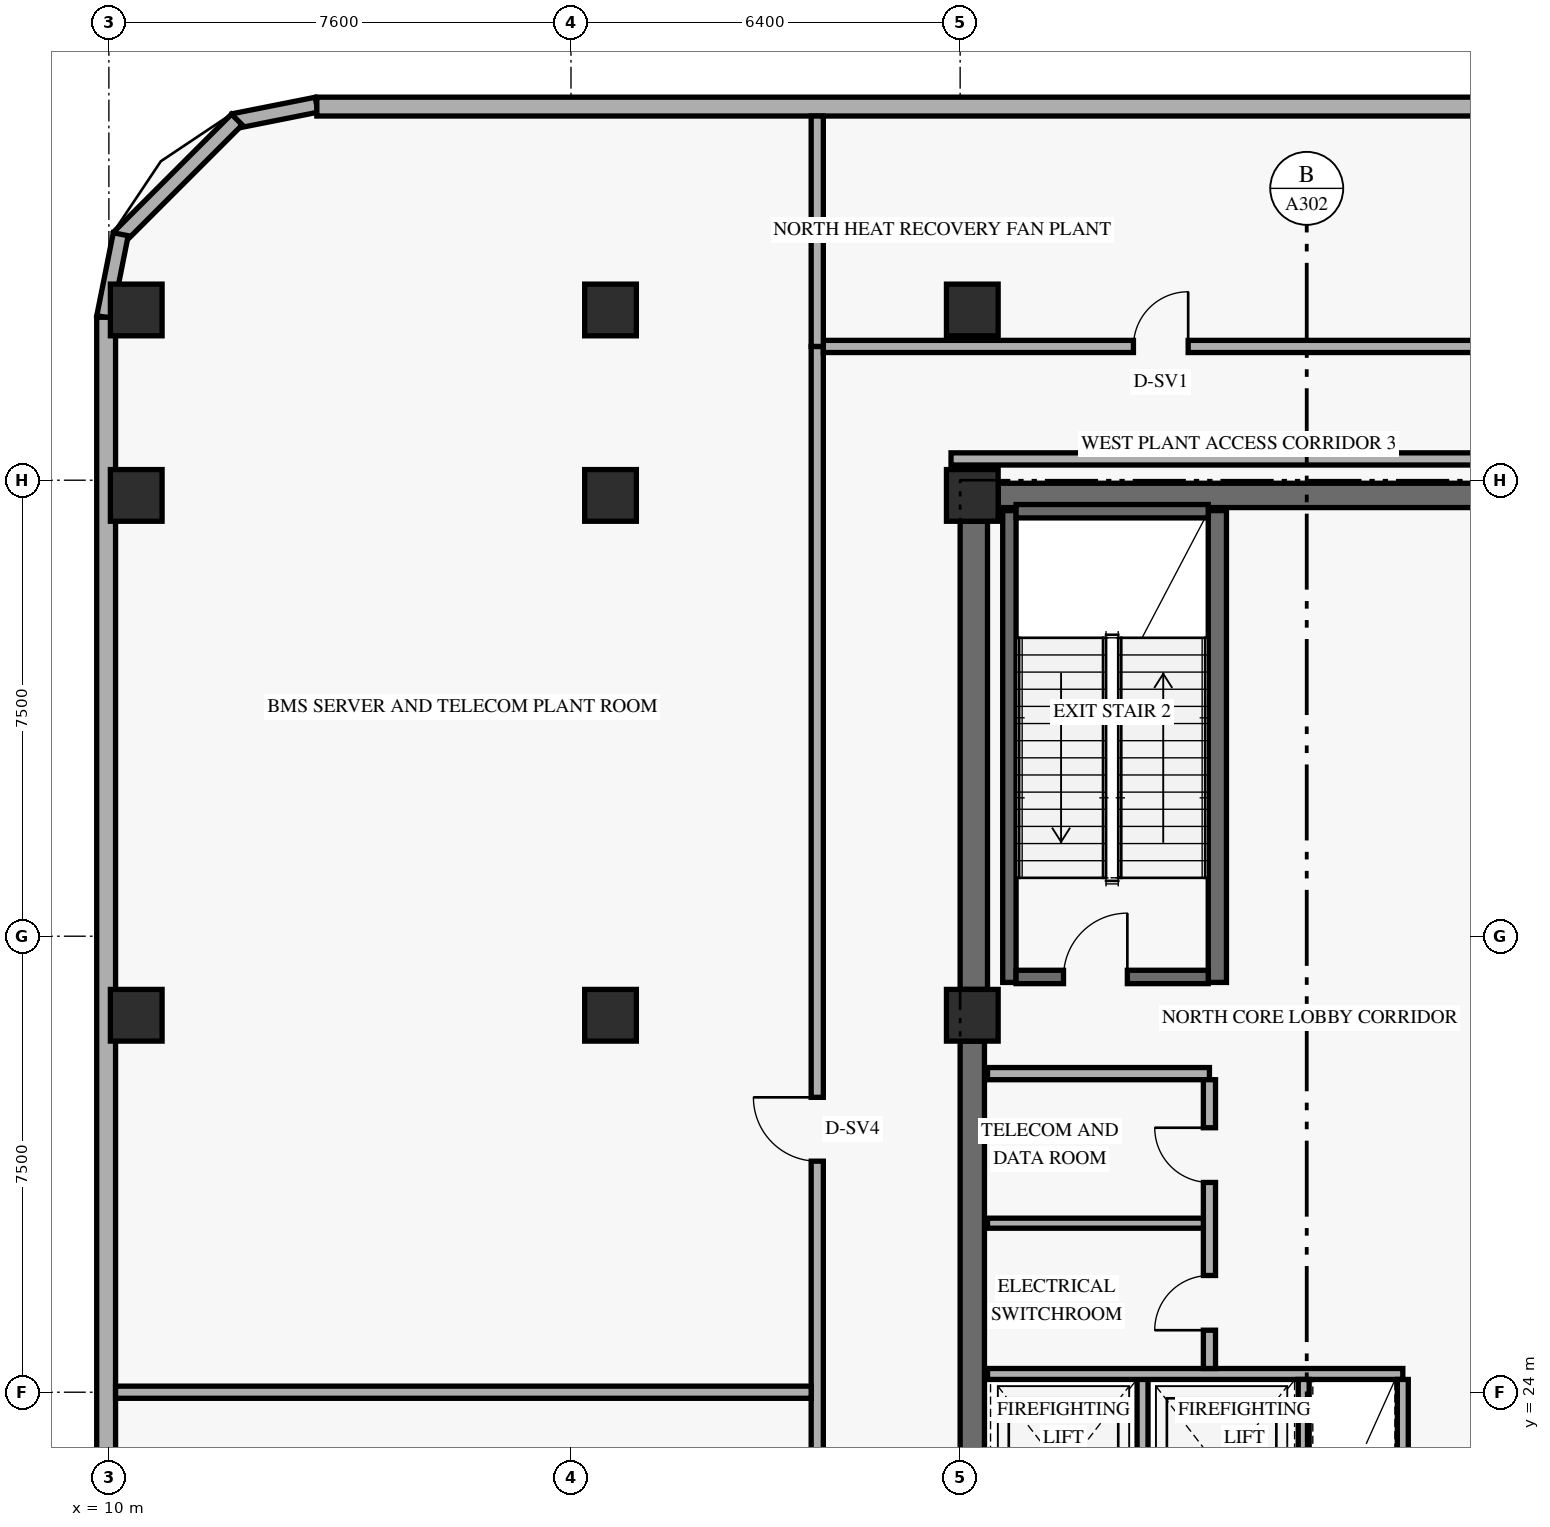
"""IFC4 building model, lengths in metres.
Left out: names, types, materials, properties, quantities, classifications, styles, units other than length and angle.
Written with IfcOpenShell. Run it as: python <this file> out.ifc"""

import sys

from ifc_helpers import new_model, si_unit, direction, frame, frame_2d, origin, origin_2d, place, context, subcontext, project, spatial, rectangle, extrude, element, fill, save


model = new_model("IFC4")
c1 = context("Model", 3, precision=1e-05, world=origin(), true_north=direction((0.0, 1.0)))
c2 = subcontext(c1, "Body", "Model", "MODEL_VIEW")
j1 = project(units=[si_unit("LENGTHUNIT", "METRE"), si_unit("PLANEANGLEUNIT", "RADIAN")], contexts=[c1])
p1 = place(None, origin())
s1 = spatial("IfcSite", under=j1, at=p1, CompositionType="ELEMENT")
p2 = place(p1, origin())
s2 = spatial("IfcBuilding", under=s1, at=p2, CompositionType="ELEMENT")
p3 = place(p2, frame((0.0, 0.0, 135.6)))
s3 = spatial("IfcBuildingStorey", under=s2, at=p3, CompositionType="ELEMENT", Elevation=135.6)
p4 = place(p3, frame((24.2, 17.975, 0.0), z_axis=(0.0, 0.0, 1.0), x_axis=(0.0, 1.0, 0.0)))
e1 = element("IfcWall", 1, at=p4, inside=s3, PredefinedType="SHEAR", context=c2, shape_type="SweptSolid", body=[
    extrude(rectangle(XDim=11.8, YDim=0.4, at=frame_2d((5.9, 0.0))), origin(), (0.0, 0.0, 1.0), 4.549),
])
p5 = place(p3, frame((24.225, 30.625, 0.0), z_axis=(0.0, 0.0, 1.0), x_axis=(0.0, 1.0, 0.0)))
e2 = element("IfcWall", 2, at=p5, inside=s3, PredefinedType="SHEAR", context=c2, shape_type="SweptSolid", body=[
    extrude(rectangle(XDim=7.7, YDim=0.45, at=frame_2d((3.85, 0.0))), origin(), (0.0, 0.0, 1.0), 4.549),
])
p6 = place(p3, frame((24.625, 38.75, 0.0), z_axis=(0.0, 0.0, 1.0), x_axis=(1.0, 0.0, 0.0)))
e3 = element("IfcWall", 3, at=p6, inside=s3, PredefinedType="SHEAR", context=c2, shape_type="SweptSolid", body=[
    extrude(rectangle(XDim=10.15, YDim=0.4, at=frame_2d((5.075, 0.0))), origin(), (0.0, 0.0, 1.0), 5.16),
])
p7 = place(p3, frame((24.81, 30.74, 0.0), z_axis=(0.0, 0.0, 1.0), x_axis=(0.0, 1.0, 0.0)))
e4 = element("IfcWall", 4, at=p7, inside=s3, PredefinedType="SHEAR", context=c2, shape_type="SweptSolid", body=[
    extrude(rectangle(XDim=7.76, YDim=0.22, at=frame_2d((3.88, 0.0))), origin(), (0.0, 0.0, 1.0), 5.16),
])
p8 = place(p3, frame((28.23, 30.74, 0.0), z_axis=(0.0, 0.0, 1.0), x_axis=(0.0, 1.0, 0.0)))
e5 = element("IfcWall", 5, at=p8, inside=s3, PredefinedType="SHEAR", context=c2, shape_type="SweptSolid", body=[
    extrude(rectangle(XDim=7.76, YDim=0.3, at=frame_2d((3.88, 0.0))), origin(), (0.0, 0.0, 1.0), 5.16),
])
p9 = place(p3, frame((24.92, 30.83, 0.0), z_axis=(0.0, 0.0, 1.0), x_axis=(1.0, 0.0, 0.0)))
e6 = element("IfcWall", 6, at=p9, inside=s3, PredefinedType="SHEAR", context=c2, shape_type="SweptSolid", body=[
    extrude(rectangle(XDim=3.16, YDim=0.22, at=frame_2d((1.58, 0.0))), origin(), (0.0, 0.0, 1.0), 5.16),
])
p10 = place(p9, frame((0.78, 0.0, 0.0)))
e7 = element("IfcOpeningElement", 7, at=p10, cuts=e6, PredefinedType="OPENING", context=c2, shape_type="SweptSolid", body=[
    extrude(rectangle(XDim=1.05, YDim=2.15, at=frame_2d((0.525, 1.075))), frame((0.0, 0.12, 0.0), z_axis=(0.0, -1.0, 0.0), x_axis=(1.0, 0.0, 0.0)), (0.0, 0.0, 1.0), 0.24),
])
p11 = place(p3, frame((24.92, 38.49, 0.0), z_axis=(0.0, 0.0, 1.0), x_axis=(1.0, 0.0, 0.0)))
e8 = element("IfcWall", 8, at=p11, inside=s3, PredefinedType="SHEAR", context=c2, shape_type="SweptSolid", body=[
    extrude(rectangle(XDim=3.16, YDim=0.22, at=frame_2d((1.58, 0.0))), origin(), (0.0, 0.0, 1.0), 5.16),
])
for number, where, z_axis, x_axis in (
    (9, (10.45, 30.2, 0.0), (0.0, 0.0, 1.0), (1.0, 0.0, 0.0)),
    (10, (10.45, 38.75, 0.0), (0.0, 0.0, 1.0), (1.0, 0.0, 0.0)),
    (11, (10.45, 41.8, 0.0), (0.0, 0.0, 1.0), (1.0, 0.0, 0.0)),
    (12, (18.25, 30.2, 0.0), (0.0, 0.0, 1.0), (1.0, 0.0, 0.0)),
    (13, (18.25, 38.75, 0.0), (0.0, 0.0, 1.0), (1.0, 0.0, 0.0)),
    (14, (18.25, 41.8, 0.0), (0.0, 0.0, 1.0), (1.0, 0.0, 0.0)),
    (15, (24.2, 30.2, 0.0), (0.0, 0.0, 1.0), (1.0, 0.0, 0.0)),
    (16, (24.2, 38.75, 0.0), (0.0, 0.0, 1.0), (1.0, 0.0, 0.0)),
    (17, (24.2, 41.8, 0.0), (0.0, 0.0, 1.0), (1.0, 0.0, 0.0)),
):
    element("IfcColumn", number, at=place(p3, frame(where, z_axis=z_axis, x_axis=x_axis)), inside=s3, PredefinedType="COLUMN", context=c2, shape_type="SweptSolid", body=[
        extrude(rectangle(XDim=0.85, YDim=0.85, at=origin_2d()), origin(), (0.0, 0.0, 1.0), 5.4),
    ])
p12 = place(p3, frame((13.417, 45.176, 0.0), z_axis=(0.0, 0.0, 1.0), x_axis=(-0.980809899341, -0.19496651342, 0.0)))
e18 = element("IfcWall", 18, at=p12, inside=s3, PredefinedType="SOLIDWALL", context=c2, shape_type="SweptSolid", body=[
    extrude(rectangle(XDim=1.389, YDim=0.25, at=frame_2d((0.694, 0.0))), origin(), (0.0, 0.0, 1.0), 5.16),
])
p13 = place(p3, frame((12.105, 44.932, 0.0), z_axis=(0.0, 0.0, 1.0), x_axis=(-0.707151344399, -0.707062215165, 0.0)))
e19 = element("IfcWall", 19, at=p13, inside=s3, PredefinedType="SOLIDWALL", context=c2, shape_type="SweptSolid", body=[
    extrude(rectangle(XDim=2.739, YDim=0.25, at=frame_2d((1.37, 0.0))), origin(), (0.0, 0.0, 1.0), 5.16),
])
p14 = place(p3, frame((10.195, 43.045, 0.0), z_axis=(0.0, 0.0, 1.0), x_axis=(-0.195000137217, -0.980803214965, 0.0)))
e20 = element("IfcWall", 20, at=p14, inside=s3, PredefinedType="SOLIDWALL", context=c2, shape_type="SweptSolid", body=[
    extrude(rectangle(XDim=1.388, YDim=0.25, at=frame_2d((0.694, 0.0))), origin(), (0.0, 0.0, 1.0), 5.16),
])
p15 = place(p3, frame((49.98, 45.145, 0.0), z_axis=(0.0, 0.0, 1.0), x_axis=(-1.0, 0.0, 0.0)))
e21 = element("IfcWall", 21, at=p15, inside=s3, PredefinedType="SOLIDWALL", context=c2, shape_type="SweptSolid", body=[
    extrude(rectangle(XDim=36.56, YDim=0.31, at=frame_2d((18.28, 0.0))), origin(), (0.0, 0.0, 1.0), 5.16),
])
p16 = place(p3, frame((9.955, 41.68, 0.0), z_axis=(0.0, 0.0, 1.0), x_axis=(0.0, -1.0, 0.0)))
e22 = element("IfcWall", 22, at=p16, inside=s3, PredefinedType="SOLIDWALL", context=c2, shape_type="SweptSolid", body=[
    extrude(rectangle(XDim=35.36, YDim=0.31, at=frame_2d((17.68, 0.0))), origin(), (0.0, 0.0, 1.0), 5.16),
])
p17 = place(p3, frame((27.0, 21.19, 0.0), z_axis=(0.0, 0.0, 1.0), x_axis=(0.0, 1.0, 0.0)))
e23 = element("IfcWall", 23, at=p17, inside=s3, PredefinedType="STANDARD", context=c2, shape_type="SweptSolid", body=[
    extrude(rectangle(XDim=3.11, YDim=0.18, at=frame_2d((1.555, 0.0))), origin(), (0.0, 0.0, 1.0), 5.16),
])
p18 = place(p3, frame((24.45, 24.3, 0.0), z_axis=(0.0, 0.0, 1.0), x_axis=(1.0, 0.0, 0.0)))
e24 = element("IfcWall", 24, at=p18, inside=s3, PredefinedType="STANDARD", context=c2, shape_type="SweptSolid", body=[
    extrude(rectangle(XDim=6.83, YDim=0.18, at=frame_2d((3.415, 0.0))), origin(), (0.0, 0.0, 1.0), 5.16),
])
for number, where, z_axis, x_axis in (
    (25, (29.65, 21.19, 0.0), (0.0, 0.0, 1.0), (0.0, 1.0, 0.0)),
    (26, (31.28, 21.19, 0.0), (0.0, 0.0, 1.0), (0.0, 1.0, 0.0)),
):
    element("IfcWall", number, at=place(p3, frame(where, z_axis=z_axis, x_axis=x_axis)), inside=s3, PredefinedType="STANDARD", context=c2, shape_type="SweptSolid", body=[
        extrude(rectangle(XDim=3.02, YDim=0.18, at=frame_2d((1.51, 0.0))), origin(), (0.0, 0.0, 1.0), 5.16),
    ])
p19 = place(p3, frame((24.45, 29.24, 0.0), z_axis=(0.0, 0.0, 1.0), x_axis=(1.0, 0.0, 0.0)))
e27 = element("IfcWall", 27, at=p19, inside=s3, PredefinedType="STANDARD", context=c2, shape_type="SweptSolid", body=[
    extrude(rectangle(XDim=3.65, YDim=0.2, at=frame_2d((1.825, 0.0))), origin(), (0.0, 0.0, 1.0), 5.16),
])
p20 = place(p3, frame((28.1, 24.39, 0.0), z_axis=(0.0, 0.0, 1.0), x_axis=(0.0, 1.0, 0.0)))
e28 = element("IfcWall", 28, at=p20, inside=s3, PredefinedType="STANDARD", context=c2, shape_type="SweptSolid", body=[
    extrude(rectangle(XDim=4.75, YDim=0.2, at=frame_2d((2.375, 0.0))), origin(), (0.0, 0.0, 1.0), 5.16),
])
p21 = place(p20, frame((0.63, 0.0, 0.0)))
e29 = element("IfcOpeningElement", 29, at=p21, cuts=e28, PredefinedType="OPENING", context=c2, shape_type="SweptSolid", body=[
    extrude(rectangle(XDim=0.9, YDim=2.1, at=frame_2d((0.45, 1.05))), frame((0.0, 0.11, 0.0), z_axis=(0.0, -1.0, 0.0), x_axis=(1.0, 0.0, 0.0)), (0.0, 0.0, 1.0), 0.22),
])
p22 = place(p20, frame((3.06, 0.0, 0.0)))
e30 = element("IfcOpeningElement", 30, at=p22, cuts=e28, PredefinedType="OPENING", context=c2, shape_type="SweptSolid", body=[
    extrude(rectangle(XDim=0.9, YDim=2.1, at=frame_2d((0.45, 1.05))), frame((0.0, 0.11, 0.0), z_axis=(0.0, -1.0, 0.0), x_axis=(1.0, 0.0, 0.0)), (0.0, 0.0, 1.0), 0.22),
])
p23 = place(p3, frame((24.45, 26.78, 0.0), z_axis=(0.0, 0.0, 1.0), x_axis=(1.0, 0.0, 0.0)))
e31 = element("IfcWall", 31, at=p23, inside=s3, PredefinedType="PARTITIONING", context=c2, shape_type="SweptSolid", body=[
    extrude(rectangle(XDim=3.55, YDim=0.165, at=frame_2d((1.775, 0.0))), origin(), (0.0, 0.0, 1.0), 5.16),
])
p24 = place(p3, frame((21.65, 6.8, 0.0), z_axis=(0.0, 0.0, 1.0), x_axis=(0.0, 1.0, 0.0)))
e32 = element("IfcWall", 32, at=p24, inside=s3, PredefinedType="STANDARD", context=c2, shape_type="SweptSolid", body=[
    extrude(rectangle(XDim=34.4, YDim=0.2, at=frame_2d((17.2, 0.0))), origin(), (0.0, 0.0, 1.0), 4.531),
])
p25 = place(p24, frame((7.0, 0.0, 0.0)))
e33 = element("IfcOpeningElement", 33, at=p25, cuts=e32, PredefinedType="OPENING", context=c2, shape_type="SweptSolid", body=[
    extrude(rectangle(XDim=1.05, YDim=2.15, at=frame_2d((0.525, 1.075))), frame((0.0, 0.11, 0.0), z_axis=(0.0, -1.0, 0.0), x_axis=(1.0, 0.0, 0.0)), (0.0, 0.0, 1.0), 0.22),
])
p26 = place(p24, frame((21.0, 0.0, 0.0)))
e34 = element("IfcOpeningElement", 34, at=p26, cuts=e32, PredefinedType="OPENING", context=c2, shape_type="SweptSolid", body=[
    extrude(rectangle(XDim=1.05, YDim=2.15, at=frame_2d((0.525, 1.075))), frame((0.0, 0.11, 0.0), z_axis=(0.0, -1.0, 0.0), x_axis=(1.0, 0.0, 0.0)), (0.0, 0.0, 1.0), 0.22),
])
p27 = place(p3, frame((21.75, 41.2, 0.0), z_axis=(0.0, 0.0, 1.0), x_axis=(1.0, 0.0, 0.0)))
e35 = element("IfcWall", 35, at=p27, inside=s3, PredefinedType="STANDARD", context=c2, shape_type="SweptSolid", body=[
    extrude(rectangle(XDim=15.6, YDim=0.2, at=frame_2d((7.8, 0.0))), origin(), (0.0, 0.0, 1.0), 4.531),
])
p28 = place(p27, frame((5.1, 0.0, 0.0)))
e36 = element("IfcOpeningElement", 36, at=p28, cuts=e35, PredefinedType="OPENING", context=c2, shape_type="SweptSolid", body=[
    extrude(rectangle(XDim=0.9, YDim=2.1, at=frame_2d((0.45, 1.05))), frame((0.0, 0.11, 0.0), z_axis=(0.0, -1.0, 0.0), x_axis=(1.0, 0.0, 0.0)), (0.0, 0.0, 1.0), 0.22),
])
p29 = place(p3, frame((23.85, 39.35, 0.0), z_axis=(0.0, 0.0, 1.0), x_axis=(1.0, 0.0, 0.0)))
e37 = element("IfcWall", 37, at=p29, inside=s3, PredefinedType="STANDARD", context=c2, shape_type="SweptSolid", body=[
    extrude(rectangle(XDim=11.47, YDim=0.2, at=frame_2d((5.735, 0.0))), origin(), (0.0, 0.0, 1.0), 4.531),
])
p30 = place(p3, frame((21.65, 41.2, 0.0), z_axis=(0.0, 0.0, 1.0), x_axis=(0.0, 1.0, 0.0)))
e38 = element("IfcWall", 38, at=p30, inside=s3, PredefinedType="STANDARD", context=c2, shape_type="SweptSolid", body=[
    extrude(rectangle(XDim=3.79, YDim=0.2, at=frame_2d((1.895, 0.0))), origin(), (0.0, 0.0, 1.0), 4.609),
])
p31 = place(p3, frame((10.11, 24.0, 0.0), z_axis=(0.0, 0.0, 1.0), x_axis=(1.0, 0.0, 0.0)))
e39 = element("IfcWall", 39, at=p31, inside=s3, PredefinedType="STANDARD", context=c2, shape_type="SweptSolid", body=[
    extrude(rectangle(XDim=11.44, YDim=0.2, at=frame_2d((5.72, 0.0))), origin(), (0.0, 0.0, 1.0), 4.531),
])
p32 = place(p10, origin())
e40 = element("IfcDoor", 40, at=p32, inside=s3, OperationType="SINGLE_SWING_RIGHT", PredefinedType="DOOR", context=c2, shape_type="SweptSolid", body=[
    extrude(rectangle(XDim=1.05, YDim=2.15, at=frame_2d((0.525, 1.075))), frame((0.0, 0.025, 0.0), z_axis=(0.0, -1.0, 0.0), x_axis=(1.0, 0.0, 0.0)), (0.0, 0.0, 1.0), 0.05),
])
fill(e7, e40)
p33 = place(p21, origin())
e41 = element("IfcDoor", 41, at=p33, inside=s3, OperationType="SINGLE_SWING_LEFT", PredefinedType="DOOR", context=c2, shape_type="SweptSolid", body=[
    extrude(rectangle(XDim=0.9, YDim=2.1, at=frame_2d((0.45, 1.05))), frame((0.0, 0.025, 0.0), z_axis=(0.0, -1.0, 0.0), x_axis=(1.0, 0.0, 0.0)), (0.0, 0.0, 1.0), 0.05),
])
fill(e29, e41)
p34 = place(p22, origin())
e42 = element("IfcDoor", 42, at=p34, inside=s3, OperationType="SINGLE_SWING_RIGHT", PredefinedType="DOOR", context=c2, shape_type="SweptSolid", body=[
    extrude(rectangle(XDim=0.9, YDim=2.1, at=frame_2d((0.45, 1.05))), frame((0.0, 0.025, 0.0), z_axis=(0.0, -1.0, 0.0), x_axis=(1.0, 0.0, 0.0)), (0.0, 0.0, 1.0), 0.05),
])
fill(e30, e42)
p35 = place(p26, origin())
e43 = element("IfcDoor", 43, at=p35, inside=s3, OperationType="SINGLE_SWING_RIGHT", PredefinedType="DOOR", context=c2, shape_type="SweptSolid", body=[
    extrude(rectangle(XDim=1.05, YDim=2.15, at=frame_2d((0.525, 1.075))), frame((0.0, 0.025, 0.0), z_axis=(0.0, -1.0, 0.0), x_axis=(1.0, 0.0, 0.0)), (0.0, 0.0, 1.0), 0.05),
])
fill(e34, e43)
p36 = place(p28, origin())
e44 = element("IfcDoor", 44, at=p36, inside=s3, OperationType="SINGLE_SWING_RIGHT", PredefinedType="DOOR", context=c2, shape_type="SweptSolid", body=[
    extrude(rectangle(XDim=0.9, YDim=2.1, at=frame_2d((0.45, 1.05))), frame((0.0, 0.025, 0.0), z_axis=(0.0, -1.0, 0.0), x_axis=(1.0, 0.0, 0.0)), (0.0, 0.0, 1.0), 0.05),
])
fill(e36, e44)
save(model, sys.argv[1])
